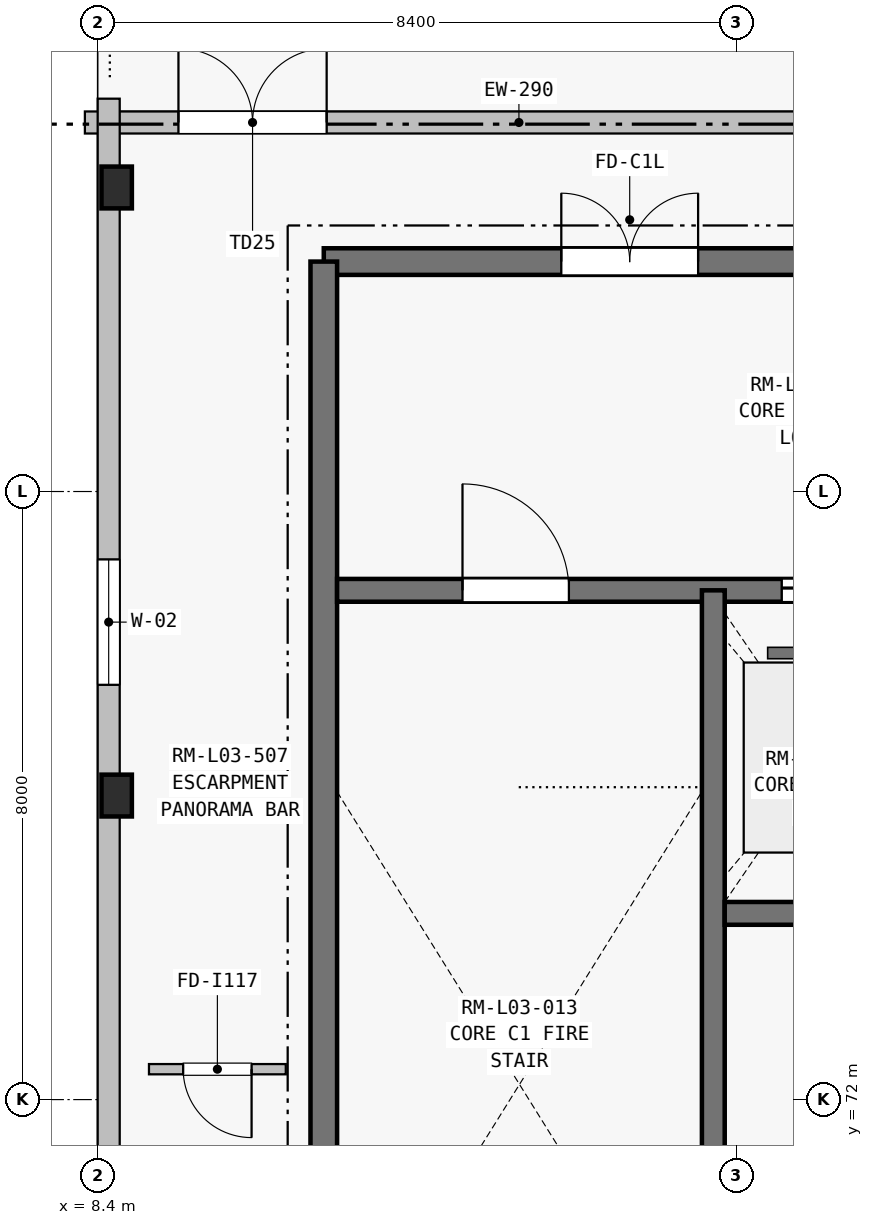
"""IFC4 building model, lengths in metres.
Left out: names, types, materials, properties, quantities, classifications, styles, units other than length and angle.
Written with IfcOpenShell. Run it as: python <this file> out.ifc"""

import sys

from ifc_helpers import new_model, si_unit, direction, frame, frame_2d, origin, origin_2d, place, context, subcontext, project, spatial, rectangle, extrude, element, fill, save


model = new_model("IFC4")
c1 = context("Model", 3, precision=1e-05, world=origin(), true_north=direction((0.0, 1.0)))
c2 = subcontext(c1, "Body", "Model", "MODEL_VIEW")
j1 = project(units=[si_unit("LENGTHUNIT", "METRE"), si_unit("PLANEANGLEUNIT", "RADIAN")], contexts=[c1])
p1 = place(None, origin())
s1 = spatial("IfcSite", under=j1, at=p1, CompositionType="ELEMENT")
p2 = place(p1, origin())
s2 = spatial("IfcBuilding", under=s1, at=p2, CompositionType="ELEMENT")
p3 = place(p2, frame((0.0, 0.0, 14.4)))
s3 = spatial("IfcBuildingStorey", under=s2, at=p3, CompositionType="ELEMENT", Elevation=14.4)
for number, where, z_axis, x_axis in (
    (1, (8.65, 76.0, 0.0), (0.0, 0.0, 1.0), (1.0, 0.0, 0.0)),
    (2, (8.65, 84.0, 0.0), (0.0, 0.0, 1.0), (1.0, 0.0, 0.0)),
):
    element("IfcColumn", number, at=place(p3, frame(where, z_axis=z_axis, x_axis=x_axis)), inside=s3, PredefinedType="PILASTER", context=c2, shape_type="SweptSolid", body=[
        extrude(rectangle(XDim=0.4, YDim=0.55, at=origin_2d()), origin(), (0.0, 0.0, 1.0), 5.45),
    ])
p4 = place(p3, frame((8.232, 84.855, 0.0), z_axis=(0.0, 0.0, 1.0), x_axis=(1.0, 0.0, 0.0)))
e3 = element("IfcWall", 3, at=p4, inside=s3, PredefinedType="SOLIDWALL", context=c2, shape_type="SweptSolid", body=[
    extrude(rectangle(XDim=11.421, YDim=0.29, at=frame_2d((5.711, 0.0))), origin(), (0.0, 0.0, 1.0), 4.26),
])
p5 = place(p4, frame((1.231, 0.0, 0.0)))
e4 = element("IfcOpeningElement", 4, at=p5, cuts=e3, PredefinedType="OPENING", context=c2, shape_type="SweptSolid", body=[
    extrude(rectangle(XDim=1.95, YDim=2.35, at=frame_2d((0.975, 1.175))), frame((0.0, 0.155, 0.0), z_axis=(0.0, -1.0, 0.0), x_axis=(1.0, 0.0, 0.0)), (0.0, 0.0, 1.0), 0.31),
])
p6 = place(p3, frame((8.545, 42.832, 0.0), z_axis=(0.0, 0.0, 1.0), x_axis=(0.0, 1.0, 0.0)))
e5 = element("IfcWall", 5, at=p6, inside=s3, PredefinedType="SOLIDWALL", context=c2, shape_type="SweptSolid", body=[
    extrude(rectangle(XDim=42.336, YDim=0.29, at=frame_2d((21.168, 0.0))), origin(), (0.0, 0.0, 1.0), 4.26),
])
p7 = place(p6, frame((11.225, 0.0, 0.9)))
e6 = element("IfcOpeningElement", 6, at=p7, cuts=e5, PredefinedType="OPENING", context=c2, shape_type="SweptSolid", body=[
    extrude(rectangle(XDim=2.45, YDim=1.35, at=frame_2d((1.225, 0.675))), frame((0.0, 0.155, 0.0), z_axis=(0.0, -1.0, 0.0), x_axis=(1.0, 0.0, 0.0)), (0.0, 0.0, 1.0), 0.31),
])
p8 = place(p6, frame((21.225, 0.0, 0.9)))
e7 = element("IfcOpeningElement", 7, at=p8, cuts=e5, PredefinedType="OPENING", context=c2, shape_type="SweptSolid", body=[
    extrude(rectangle(XDim=0.85, YDim=2.1, at=frame_2d((0.425, 1.05))), frame((0.0, 0.155, 0.0), z_axis=(0.0, -1.0, 0.0), x_axis=(1.0, 0.0, 0.0)), (0.0, 0.0, 1.0), 0.31),
])
p9 = place(p6, frame((34.625, 0.0, 0.75)))
e8 = element("IfcOpeningElement", 8, at=p9, cuts=e5, PredefinedType="OPENING", context=c2, shape_type="SweptSolid", body=[
    extrude(rectangle(XDim=1.65, YDim=2.4, at=frame_2d((0.825, 1.2))), frame((0.0, 0.155, 0.0), z_axis=(0.0, -1.0, 0.0), x_axis=(1.0, 0.0, 0.0)), (0.0, 0.0, 1.0), 0.31),
])
p10 = place(p3, frame((11.375, 83.025, 0.0), z_axis=(0.0, 0.0, 1.0), x_axis=(1.0, 0.0, 0.0)))
e9 = element("IfcWall", 9, at=p10, inside=s3, PredefinedType="SHEAR", context=c2, shape_type="SweptSolid", body=[
    extrude(rectangle(XDim=8.05, YDim=0.35, at=frame_2d((4.025, 0.0))), origin(), (0.0, 0.0, 1.0), 4.5),
])
p11 = place(p10, frame((3.125, 0.0, 0.0)))
e10 = element("IfcOpeningElement", 10, at=p11, cuts=e9, PredefinedType="OPENING", context=c2, shape_type="SweptSolid", body=[
    extrude(rectangle(XDim=1.8, YDim=2.25, at=frame_2d((0.9, 1.125))), frame((0.0, 0.185, 0.0), z_axis=(0.0, -1.0, 0.0), x_axis=(1.0, 0.0, 0.0)), (0.0, 0.0, 1.0), 0.37),
])
p12 = place(p3, frame((11.375, 68.175, 0.0), z_axis=(0.0, 0.0, 1.0), x_axis=(0.0, 1.0, 0.0)))
e11 = element("IfcWall", 11, at=p12, inside=s3, PredefinedType="SHEAR", context=c2, shape_type="SweptSolid", body=[
    extrude(rectangle(XDim=14.85, YDim=0.35, at=frame_2d((7.425, 0.0))), origin(), (0.0, 0.0, 1.0), 4.5),
])
p13 = place(p3, frame((11.55, 78.7, 0.0), z_axis=(0.0, 0.0, 1.0), x_axis=(1.0, 0.0, 0.0)))
e12 = element("IfcWall", 12, at=p13, inside=s3, PredefinedType="SHEAR", context=c2, shape_type="SweptSolid", body=[
    extrude(rectangle(XDim=7.7, YDim=0.3, at=frame_2d((3.85, 0.0))), origin(), (0.0, 0.0, 1.0), 4.5),
])
p14 = place(p13, frame((1.65, 0.0, 0.0)))
e13 = element("IfcOpeningElement", 13, at=p14, cuts=e12, PredefinedType="OPENING", context=c2, shape_type="SweptSolid", body=[
    extrude(rectangle(XDim=1.4, YDim=2.2, at=frame_2d((0.7, 1.1))), frame((0.0, 0.16, 0.0), z_axis=(0.0, -1.0, 0.0), x_axis=(1.0, 0.0, 0.0)), (0.0, 0.0, 1.0), 0.32),
])
p15 = place(p13, frame((5.85, 0.0, 0.0)))
e14 = element("IfcOpeningElement", 14, at=p15, cuts=e12, PredefinedType="OPENING", context=c2, shape_type="SweptSolid", body=[
    extrude(rectangle(XDim=1.1, YDim=2.2, at=frame_2d((0.55, 1.1))), frame((0.0, 0.16, 0.0), z_axis=(0.0, -1.0, 0.0), x_axis=(1.0, 0.0, 0.0)), (0.0, 0.0, 1.0), 0.32),
])
p16 = place(p3, frame((16.5, 68.35, 0.0), z_axis=(0.0, 0.0, 1.0), x_axis=(0.0, 1.0, 0.0)))
e15 = element("IfcWall", 15, at=p16, inside=s3, PredefinedType="SHEAR", context=c2, shape_type="SweptSolid", body=[
    extrude(rectangle(XDim=10.35, YDim=0.3, at=frame_2d((5.175, 0.0))), origin(), (0.0, 0.0, 1.0), 4.5),
])
p17 = place(p3, frame((16.65, 74.45, 0.0), z_axis=(0.0, 0.0, 1.0), x_axis=(1.0, 0.0, 0.0)))
e16 = element("IfcWall", 16, at=p17, inside=s3, PredefinedType="SHEAR", context=c2, shape_type="SweptSolid", body=[
    extrude(rectangle(XDim=2.6, YDim=0.3, at=frame_2d((1.3, 0.0))), origin(), (0.0, 0.0, 1.0), 4.5),
])
p18 = place(p3, frame((10.875, 72.4, 0.0), z_axis=(0.0, 0.0, 1.0), x_axis=(-1.0, 0.0, 0.0)))
e17 = element("IfcWall", 17, at=p18, inside=s3, PredefinedType="PARTITIONING", context=c2, shape_type="SweptSolid", body=[
    extrude(rectangle(XDim=1.8, YDim=0.135, at=frame_2d((0.9, 0.0))), origin(), (0.0, 0.0, 1.0), 4.26),
])
p19 = place(p18, frame((0.45, 0.0, 0.0)))
e18 = element("IfcOpeningElement", 18, at=p19, cuts=e17, PredefinedType="OPENING", context=c2, shape_type="SweptSolid", body=[
    extrude(rectangle(XDim=0.9, YDim=2.1, at=frame_2d((0.45, 1.05))), frame((0.0, 0.077, 0.0), z_axis=(0.0, -1.0, 0.0), x_axis=(1.0, 0.0, 0.0)), (0.0, 0.0, 1.0), 0.155),
])
p20 = place(p5, origin())
e19 = element("IfcDoor", 19, at=p20, inside=s3, OperationType="DOUBLE_DOOR_SINGLE_SWING", PredefinedType="DOOR", context=c2, shape_type="SweptSolid", body=[
    extrude(rectangle(XDim=1.95, YDim=2.35, at=frame_2d((0.975, 1.175))), frame((0.0, 0.025, 0.0), z_axis=(0.0, -1.0, 0.0), x_axis=(1.0, 0.0, 0.0)), (0.0, 0.0, 1.0), 0.05),
])
fill(e4, e19)
p21 = place(p9, origin())
e20 = element("IfcWindow", 20, at=p21, inside=s3, PartitioningType="SINGLE_PANEL", PredefinedType="WINDOW", context=c2, shape_type="SweptSolid", body=[
    extrude(rectangle(XDim=1.65, YDim=2.4, at=frame_2d((0.825, 1.2))), frame((0.0, 0.03, 0.0), z_axis=(0.0, -1.0, 0.0), x_axis=(1.0, 0.0, 0.0)), (0.0, 0.0, 1.0), 0.06),
])
fill(e8, e20)
p22 = place(p11, origin())
e21 = element("IfcDoor", 21, at=p22, inside=s3, OperationType="DOUBLE_DOOR_SINGLE_SWING", PredefinedType="DOOR", context=c2, shape_type="SweptSolid", body=[
    extrude(rectangle(XDim=1.8, YDim=2.25, at=frame_2d((0.9, 1.125))), frame((0.0, 0.025, 0.0), z_axis=(0.0, -1.0, 0.0), x_axis=(1.0, 0.0, 0.0)), (0.0, 0.0, 1.0), 0.05),
])
fill(e10, e21)
p23 = place(p14, origin())
e22 = element("IfcDoor", 22, at=p23, inside=s3, OperationType="SINGLE_SWING_LEFT", PredefinedType="DOOR", context=c2, shape_type="SweptSolid", body=[
    extrude(rectangle(XDim=1.4, YDim=2.2, at=frame_2d((0.7, 1.1))), frame((0.0, 0.025, 0.0), z_axis=(0.0, -1.0, 0.0), x_axis=(1.0, 0.0, 0.0)), (0.0, 0.0, 1.0), 0.05),
])
fill(e13, e22)
p24 = place(p15, origin())
e23 = element("IfcDoor", 23, at=p24, inside=s3, OperationType="SLIDING_TO_LEFT", PredefinedType="DOOR", context=c2, shape_type="SweptSolid", body=[
    extrude(rectangle(XDim=1.1, YDim=2.2, at=frame_2d((0.55, 1.1))), frame((0.0, 0.025, 0.0), z_axis=(0.0, -1.0, 0.0), x_axis=(1.0, 0.0, 0.0)), (0.0, 0.0, 1.0), 0.05),
])
fill(e14, e23)
p25 = place(p19, origin())
e24 = element("IfcDoor", 24, at=p25, inside=s3, OperationType="SINGLE_SWING_LEFT", PredefinedType="DOOR", context=c2, shape_type="SweptSolid", body=[
    extrude(rectangle(XDim=0.9, YDim=2.1, at=frame_2d((0.45, 1.05))), frame((0.0, 0.025, 0.0), z_axis=(0.0, -1.0, 0.0), x_axis=(1.0, 0.0, 0.0)), (0.0, 0.0, 1.0), 0.05),
])
fill(e18, e24)
save(model, sys.argv[1])
